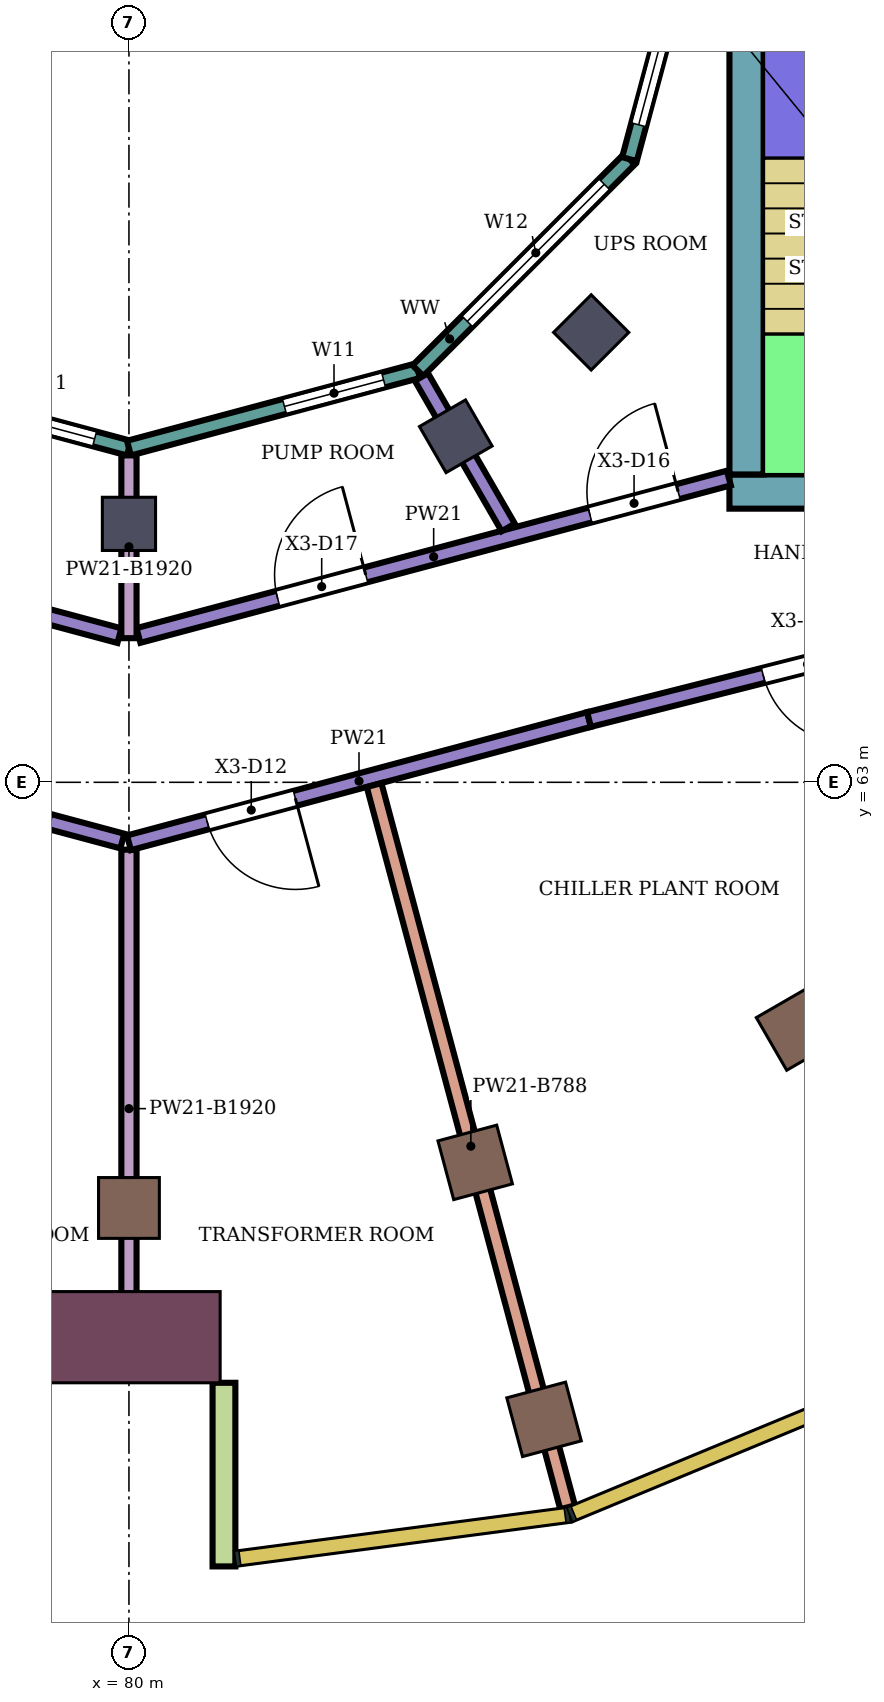
"""IFC4 building model, lengths in metres.
Left out: names, types, materials, properties, quantities, classifications, styles, units other than length and angle.
Written with IfcOpenShell. Run it as: python <this file> out.ifc"""

import sys

from ifc_helpers import new_model, si_unit, direction, frame, frame_2d, origin, origin_2d, place, context, subcontext, project, spatial, rectangle, extrude, element, fill, save


model = new_model("IFC4")
c1 = context("Model", 3, precision=1e-05, world=origin(), true_north=direction((0.0, 1.0)))
c2 = subcontext(c1, "Body", "Model", "MODEL_VIEW")
j1 = project(units=[si_unit("LENGTHUNIT", "METRE"), si_unit("PLANEANGLEUNIT", "RADIAN")], contexts=[c1])
p1 = place(None, origin())
s1 = spatial("IfcSite", under=j1, at=p1, CompositionType="ELEMENT")
p2 = place(p1, origin())
s2 = spatial("IfcBuilding", under=s1, at=p2, CompositionType="ELEMENT")
p3 = place(p2, frame((0.0, 0.0, 309.3)))
s3 = spatial("IfcBuildingStorey", under=s2, at=p3, CompositionType="ELEMENT", Elevation=309.3)
for number, where, z_axis, x_axis in (
    (1, (85.461, 54.619, 0.0), (0.0, 0.0, 1.0), (0.259, -0.966, 0.0)),
    (2, (80.0, 57.4, 0.0), (0.0, 0.0, 1.0), (0.0, -1.0, 0.0)),
    (3, (84.555, 58.0, 0.0), (0.0, 0.0, 1.0), (0.259, -0.966, 0.0)),
    (4, (88.8, 59.758, 0.0), (0.0, 0.0, 1.0), (0.5, -0.866, 0.0)),
):
    element("IfcColumn", number, at=place(p3, frame(where, z_axis=z_axis, x_axis=x_axis)), inside=s3, PredefinedType="COLUMN", context=c2, shape_type="SweptSolid", body=[
        extrude(rectangle(XDim=0.8, YDim=0.8, at=origin_2d()), origin(), (0.0, 0.0, 1.0), 5.6),
    ])
for number, where, z_axis, x_axis in (
    (5, (80.0, 66.4, 0.0), (0.0, 0.0, 1.0), (0.0, -1.0, 0.0)),
    (6, (84.3, 67.552, 0.0), (0.0, 0.0, 1.0), (0.5, -0.866, 0.0)),
    (7, (86.081, 68.919, 0.0), (0.0, 0.0, 1.0), (0.707, -0.707, 0.0)),
):
    element("IfcColumn", number, at=place(p3, frame(where, z_axis=z_axis, x_axis=x_axis)), inside=s3, PredefinedType="COLUMN", context=c2, shape_type="SweptSolid", body=[
        extrude(rectangle(XDim=0.7, YDim=0.7, at=origin_2d()), origin(), (0.0, 0.0, 1.0), 5.6),
    ])
p4 = place(p3, frame((80.0, 55.7, 0.0), z_axis=(0.0, 0.0, 1.0), x_axis=(0.0, -1.0, 0.0)))
e8 = element("IfcColumn", 8, at=p4, inside=s3, PredefinedType="COLUMN", context=c2, shape_type="SweptSolid", body=[
    extrude(rectangle(XDim=1.2, YDim=2.4, at=origin_2d()), origin(), (0.0, 0.0, 1.0), 5.6),
])
p5 = place(p3, frame((87.9, 66.825, 0.0), z_axis=(0.0, 0.0, 1.0), x_axis=(1.0, 0.0, 0.0)))
e9 = element("IfcWall", 9, at=p5, inside=s3, PredefinedType="SHEAR", context=c2, shape_type="SweptSolid", body=[
    extrude(rectangle(XDim=12.0, YDim=0.45, at=frame_2d((6.0, 0.0))), origin(), (0.0, 0.0, 1.0), 5.28),
])
p6 = place(p5, frame((4.2, 0.0, 0.0)))
e10 = element("IfcOpeningElement", 10, at=p6, cuts=e9, PredefinedType="OPENING", context=c2, shape_type="SweptSolid", body=[
    extrude(rectangle(XDim=2.4, YDim=2.4, at=frame_2d((1.2, 1.2))), frame((0.0, 0.235, 0.0), z_axis=(0.0, -1.0, 0.0), x_axis=(1.0, 0.0, 0.0)), (0.0, 0.0, 1.0), 0.47),
])
p7 = place(p3, frame((88.125, 67.05, 0.0), z_axis=(0.0, 0.0, 1.0), x_axis=(0.0, 1.0, 0.0)))
e11 = element("IfcWall", 11, at=p7, inside=s3, PredefinedType="SHEAR", context=c2, shape_type="SweptSolid", body=[
    extrude(rectangle(XDim=7.95, YDim=0.45, at=frame_2d((3.975, 0.0))), origin(), (0.0, 0.0, 1.0), 5.28),
])
p8 = place(p3, frame((81.25, 55.1, 0.0), z_axis=(0.0, 0.0, 1.0), x_axis=(0.0, -1.0, 0.0)))
e12 = element("IfcWall", 12, at=p8, inside=s3, PredefinedType="NOTDEFINED", context=c2, shape_type="SweptSolid", body=[
    extrude(rectangle(XDim=2.416, YDim=0.3, at=frame_2d((1.208, 0.0))), origin(), (0.0, 0.0, 1.0), 5.6),
])
p9 = place(p3, frame((76.198, 68.415, 0.0), z_axis=(0.0, 0.0, 1.0), x_axis=(0.965933654434, -0.258789828301, 0.0)))
e13 = element("IfcWall", 13, at=p9, inside=s3, PredefinedType="NOTDEFINED", context=c2, shape_type="SweptSolid", body=[
    extrude(rectangle(XDim=3.936, YDim=0.2, at=frame_2d((1.968, 0.0))), origin(), (0.0, 0.0, 1.0), 5.6),
])
p10 = place(p9, frame((2.118, 0.0, 0.9)))
e14 = element("IfcOpeningElement", 14, at=p10, cuts=e13, PredefinedType="OPENING", context=c2, shape_type="SweptSolid", body=[
    extrude(rectangle(XDim=1.35, YDim=2.3, at=frame_2d((0.675, 1.15))), frame((0.0, 0.11, 0.0), z_axis=(0.0, -1.0, 0.0), x_axis=(1.0, 0.0, 0.0)), (0.0, 0.0, 1.0), 0.22),
])
p11 = place(p3, frame((80.0, 67.396, 0.0), z_axis=(0.0, 0.0, 1.0), x_axis=(0.965933654434, 0.258789828301, 0.0)))
e15 = element("IfcWall", 15, at=p11, inside=s3, PredefinedType="NOTDEFINED", context=c2, shape_type="SweptSolid", body=[
    extrude(rectangle(XDim=3.936, YDim=0.2, at=frame_2d((1.968, 0.0))), origin(), (0.0, 0.0, 1.0), 5.6),
])
p12 = place(p11, frame((2.118, 0.0, 0.9)))
e16 = element("IfcOpeningElement", 16, at=p12, cuts=e15, PredefinedType="OPENING", context=c2, shape_type="SweptSolid", body=[
    extrude(rectangle(XDim=1.35, YDim=2.3, at=frame_2d((0.675, 1.15))), frame((0.0, 0.11, 0.0), z_axis=(0.0, -1.0, 0.0), x_axis=(1.0, 0.0, 0.0)), (0.0, 0.0, 1.0), 0.22),
])
p13 = place(p3, frame((83.802, 68.415, 0.0), z_axis=(0.0, 0.0, 1.0), x_axis=(0.707106781187, 0.707106781187, 0.0)))
e17 = element("IfcWall", 17, at=p13, inside=s3, PredefinedType="NOTDEFINED", context=c2, shape_type="SweptSolid", body=[
    extrude(rectangle(XDim=3.936, YDim=0.2, at=frame_2d((1.968, 0.0))), origin(), (0.0, 0.0, 1.0), 5.6),
])
p14 = place(p13, frame((0.918, 0.0, 0.9)))
e18 = element("IfcOpeningElement", 18, at=p14, cuts=e17, PredefinedType="OPENING", context=c2, shape_type="SweptSolid", body=[
    extrude(rectangle(XDim=2.55, YDim=2.3, at=frame_2d((1.275, 1.15))), frame((0.0, 0.11, 0.0), z_axis=(0.0, -1.0, 0.0), x_axis=(1.0, 0.0, 0.0)), (0.0, 0.0, 1.0), 0.22),
])
p15 = place(p3, frame((86.585, 71.198, 0.0), z_axis=(0.0, 0.0, 1.0), x_axis=(0.258789828301, 0.965933654434, 0.0)))
e19 = element("IfcWall", 19, at=p15, inside=s3, PredefinedType="NOTDEFINED", context=c2, shape_type="SweptSolid", body=[
    extrude(rectangle(XDim=3.936, YDim=0.2, at=frame_2d((1.968, 0.0))), origin(), (0.0, 0.0, 1.0), 5.6),
])
p16 = place(p15, frame((0.468, 0.0, 0.9)))
e20 = element("IfcOpeningElement", 20, at=p16, cuts=e19, PredefinedType="OPENING", context=c2, shape_type="SweptSolid", body=[
    extrude(rectangle(XDim=3.0, YDim=2.3, at=frame_2d((1.5, 1.15))), frame((0.0, 0.11, 0.0), z_axis=(0.0, -1.0, 0.0), x_axis=(1.0, 0.0, 0.0)), (0.0, 0.0, 1.0), 0.22),
])
p17 = place(p3, frame((73.947, 63.826, 0.0), z_axis=(0.0, 0.0, 1.0), x_axis=(0.965924585279, -0.258823676573, 0.0)))
e21 = element("IfcWall", 21, at=p17, inside=s3, PredefinedType="PARTITIONING", context=c2, shape_type="SweptSolid", body=[
    extrude(rectangle(XDim=6.177, YDim=0.2, at=frame_2d((3.088, 0.0))), origin(), (0.0, 0.0, 1.0), 5.15),
])
p18 = place(p17, frame((4.001, 0.0, 0.0)))
e22 = element("IfcOpeningElement", 22, at=p18, cuts=e21, PredefinedType="OPENING", context=c2, shape_type="SweptSolid", body=[
    extrude(rectangle(XDim=1.2, YDim=2.4, at=frame_2d((0.6, 1.2))), frame((0.0, 0.11, 0.0), z_axis=(0.0, -1.0, 0.0), x_axis=(1.0, 0.0, 0.0)), (0.0, 0.0, 1.0), 0.22),
])
p19 = place(p3, frame((74.603, 66.342, 0.0), z_axis=(0.0, 0.0, 1.0), x_axis=(0.965920893652, -0.258837453254, 0.0)))
e23 = element("IfcWall", 23, at=p19, inside=s3, PredefinedType="PARTITIONING", context=c2, shape_type="SweptSolid", body=[
    extrude(rectangle(XDim=5.458, YDim=0.2, at=frame_2d((2.729, 0.0))), origin(), (0.0, 0.0, 1.0), 5.15),
])
p20 = place(p19, frame((2.362, 0.0, 0.0)))
e24 = element("IfcOpeningElement", 24, at=p20, cuts=e23, PredefinedType="OPENING", context=c2, shape_type="SweptSolid", body=[
    extrude(rectangle(XDim=1.2, YDim=2.4, at=frame_2d((0.6, 1.2))), frame((0.0, 0.11, 0.0), z_axis=(0.0, -1.0, 0.0), x_axis=(1.0, 0.0, 0.0)), (0.0, 0.0, 1.0), 0.22),
])
p21 = place(p3, frame((80.125, 64.932, 0.0), z_axis=(0.0, 0.0, 1.0), x_axis=(0.966236955806, 0.257655089674, 0.0)))
e25 = element("IfcWall", 25, at=p21, inside=s3, PredefinedType="PARTITIONING", context=c2, shape_type="SweptSolid", body=[
    extrude(rectangle(XDim=8.039, YDim=0.2, at=frame_2d((4.02, 0.0))), origin(), (0.0, 0.0, 1.0), 5.15),
])
p22 = place(p21, frame((6.148, 0.0, 0.0)))
e26 = element("IfcOpeningElement", 26, at=p22, cuts=e25, PredefinedType="OPENING", context=c2, shape_type="SweptSolid", body=[
    extrude(rectangle(XDim=1.2, YDim=2.4, at=frame_2d((0.6, 1.2))), frame((0.0, 0.11, 0.0), z_axis=(0.0, -1.0, 0.0), x_axis=(1.0, 0.0, 0.0)), (0.0, 0.0, 1.0), 0.22),
])
p23 = place(p21, frame((1.895, 0.0, 0.0)))
e27 = element("IfcOpeningElement", 27, at=p23, cuts=e25, PredefinedType="OPENING", context=c2, shape_type="SweptSolid", body=[
    extrude(rectangle(XDim=1.2, YDim=2.4, at=frame_2d((0.6, 1.2))), frame((0.0, 0.11, 0.0), z_axis=(0.0, -1.0, 0.0), x_axis=(1.0, 0.0, 0.0)), (0.0, 0.0, 1.0), 0.22),
])
p24 = place(p3, frame((80.0, 55.3, 0.0), z_axis=(0.0, 0.0, 1.0), x_axis=(0.0, 1.0, 0.0)))
e28 = element("IfcWall", 28, at=p24, inside=s3, PredefinedType="PARTITIONING", context=c2, shape_type="SweptSolid", body=[
    extrude(rectangle(XDim=6.814, YDim=0.2, at=frame_2d((3.407, 0.0))), origin(), (0.0, 0.0, 1.0), 3.68),
])
p25 = place(p3, frame((80.0, 62.204, 0.0), z_axis=(0.0, 0.0, 1.0), x_axis=(0.965938139786, 0.258773086132, 0.0)))
e29 = element("IfcWall", 29, at=p25, inside=s3, PredefinedType="PARTITIONING", context=c2, shape_type="SweptSolid", body=[
    extrude(rectangle(XDim=6.266, YDim=0.2, at=frame_2d((3.133, 0.0))), origin(), (0.0, 0.0, 1.0), 5.15),
])
p26 = place(p25, frame((1.066, 0.0, 0.0)))
e30 = element("IfcOpeningElement", 30, at=p26, cuts=e29, PredefinedType="OPENING", context=c2, shape_type="SweptSolid", body=[
    extrude(rectangle(XDim=1.2, YDim=2.4, at=frame_2d((0.6, 1.2))), frame((0.0, 0.11, 0.0), z_axis=(0.0, -1.0, 0.0), x_axis=(1.0, 0.0, 0.0)), (0.0, 0.0, 1.0), 0.22),
])
p27 = place(p3, frame((80.0, 64.896, 0.0), z_axis=(0.0, 0.0, 1.0), x_axis=(0.0, 1.0, 0.0)))
e31 = element("IfcWall", 31, at=p27, inside=s3, PredefinedType="PARTITIONING", context=c2, shape_type="SweptSolid", body=[
    extrude(rectangle(XDim=2.405, YDim=0.2, at=frame_2d((1.203, 0.0))), origin(), (0.0, 0.0, 1.0), 3.68),
])
p28 = place(p3, frame((83.225, 62.963, 0.0), z_axis=(0.0, 0.0, 1.0), x_axis=(0.258811759632, -0.965927778396, 0.0)))
e32 = element("IfcWall", 32, at=p28, inside=s3, PredefinedType="PARTITIONING", context=c2, shape_type="SweptSolid", body=[
    extrude(rectangle(XDim=9.837, YDim=0.2, at=frame_2d((4.918, 0.0))), origin(), (0.0, 0.0, 1.0), 4.812),
])
p29 = place(p3, frame((83.848, 68.332, 0.0), z_axis=(0.0, 0.0, 1.0), x_axis=(0.499907387488, -0.866078867041, 0.0)))
e33 = element("IfcWall", 33, at=p29, inside=s3, PredefinedType="PARTITIONING", context=c2, shape_type="SweptSolid", body=[
    extrude(rectangle(XDim=2.286, YDim=0.2, at=frame_2d((1.143, 0.0))), origin(), (0.0, 0.0, 1.0), 5.15),
])
p30 = place(p3, frame((86.053, 63.826, 0.0), z_axis=(0.0, 0.0, 1.0), x_axis=(0.969480070232, 0.245170131586, 0.0)))
e34 = element("IfcWall", 34, at=p30, inside=s3, PredefinedType="PARTITIONING", context=c2, shape_type="SweptSolid", body=[
    extrude(rectangle(XDim=5.907, YDim=0.2, at=frame_2d((2.954, 0.0))), origin(), (0.0, 0.0, 1.0), 5.15),
])
p31 = place(p30, frame((2.364, 0.0, 0.0)))
e35 = element("IfcOpeningElement", 35, at=p31, cuts=e34, PredefinedType="OPENING", context=c2, shape_type="SweptSolid", body=[
    extrude(rectangle(XDim=1.2, YDim=2.4, at=frame_2d((0.6, 1.2))), frame((0.0, 0.11, 0.0), z_axis=(0.0, -1.0, 0.0), x_axis=(1.0, 0.0, 0.0)), (0.0, 0.0, 1.0), 0.22),
])
p32 = place(p10, origin())
e36 = element("IfcWindow", 36, at=p32, inside=s3, PartitioningType="SINGLE_PANEL", PredefinedType="WINDOW", context=c2, shape_type="SweptSolid", body=[
    extrude(rectangle(XDim=1.35, YDim=2.3, at=frame_2d((0.675, 1.15))), frame((0.0, 0.03, 0.0), z_axis=(0.0, -1.0, 0.0), x_axis=(1.0, 0.0, 0.0)), (0.0, 0.0, 1.0), 0.06),
])
fill(e14, e36)
p33 = place(p12, origin())
e37 = element("IfcWindow", 37, at=p33, inside=s3, PartitioningType="SINGLE_PANEL", PredefinedType="WINDOW", context=c2, shape_type="SweptSolid", body=[
    extrude(rectangle(XDim=1.35, YDim=2.3, at=frame_2d((0.675, 1.15))), frame((0.0, 0.03, 0.0), z_axis=(0.0, -1.0, 0.0), x_axis=(1.0, 0.0, 0.0)), (0.0, 0.0, 1.0), 0.06),
])
fill(e16, e37)
p34 = place(p14, origin())
e38 = element("IfcWindow", 38, at=p34, inside=s3, PartitioningType="SINGLE_PANEL", PredefinedType="WINDOW", context=c2, shape_type="SweptSolid", body=[
    extrude(rectangle(XDim=2.55, YDim=2.3, at=frame_2d((1.275, 1.15))), frame((0.0, 0.03, 0.0), z_axis=(0.0, -1.0, 0.0), x_axis=(1.0, 0.0, 0.0)), (0.0, 0.0, 1.0), 0.06),
])
fill(e18, e38)
p35 = place(p16, origin())
e39 = element("IfcWindow", 39, at=p35, inside=s3, PartitioningType="SINGLE_PANEL", PredefinedType="WINDOW", context=c2, shape_type="SweptSolid", body=[
    extrude(rectangle(XDim=3.0, YDim=2.3, at=frame_2d((1.5, 1.15))), frame((0.0, 0.03, 0.0), z_axis=(0.0, -1.0, 0.0), x_axis=(1.0, 0.0, 0.0)), (0.0, 0.0, 1.0), 0.06),
])
fill(e20, e39)
p36 = place(p31, frame((1.2, 0.0, 0.0), z_axis=(0.0, 0.0, 1.0), x_axis=(-1.0, 0.0, 0.0)))
e40 = element("IfcDoor", 40, at=p36, inside=s3, OperationType="SINGLE_SWING_LEFT", PredefinedType="DOOR", context=c2, shape_type="SweptSolid", body=[
    extrude(rectangle(XDim=1.2, YDim=2.4, at=frame_2d((0.6, 1.2))), frame((0.0, 0.025, 0.0), z_axis=(0.0, -1.0, 0.0), x_axis=(1.0, 0.0, 0.0)), (0.0, 0.0, 1.0), 0.05),
])
fill(e35, e40)
p37 = place(p26, frame((1.2, 0.0, 0.0), z_axis=(0.0, 0.0, 1.0), x_axis=(-1.0, 0.0, 0.0)))
e41 = element("IfcDoor", 41, at=p37, inside=s3, OperationType="SINGLE_SWING_LEFT", PredefinedType="DOOR", context=c2, shape_type="SweptSolid", body=[
    extrude(rectangle(XDim=1.2, YDim=2.4, at=frame_2d((0.6, 1.2))), frame((0.0, 0.025, 0.0), z_axis=(0.0, -1.0, 0.0), x_axis=(1.0, 0.0, 0.0)), (0.0, 0.0, 1.0), 0.05),
])
fill(e30, e41)
p38 = place(p22, origin())
e42 = element("IfcDoor", 42, at=p38, inside=s3, OperationType="SINGLE_SWING_RIGHT", PredefinedType="DOOR", context=c2, shape_type="SweptSolid", body=[
    extrude(rectangle(XDim=1.2, YDim=2.4, at=frame_2d((0.6, 1.2))), frame((0.0, 0.025, 0.0), z_axis=(0.0, -1.0, 0.0), x_axis=(1.0, 0.0, 0.0)), (0.0, 0.0, 1.0), 0.05),
])
fill(e26, e42)
p39 = place(p23, origin())
e43 = element("IfcDoor", 43, at=p39, inside=s3, OperationType="SINGLE_SWING_RIGHT", PredefinedType="DOOR", context=c2, shape_type="SweptSolid", body=[
    extrude(rectangle(XDim=1.2, YDim=2.4, at=frame_2d((0.6, 1.2))), frame((0.0, 0.025, 0.0), z_axis=(0.0, -1.0, 0.0), x_axis=(1.0, 0.0, 0.0)), (0.0, 0.0, 1.0), 0.05),
])
fill(e27, e43)
save(model, sys.argv[1])
